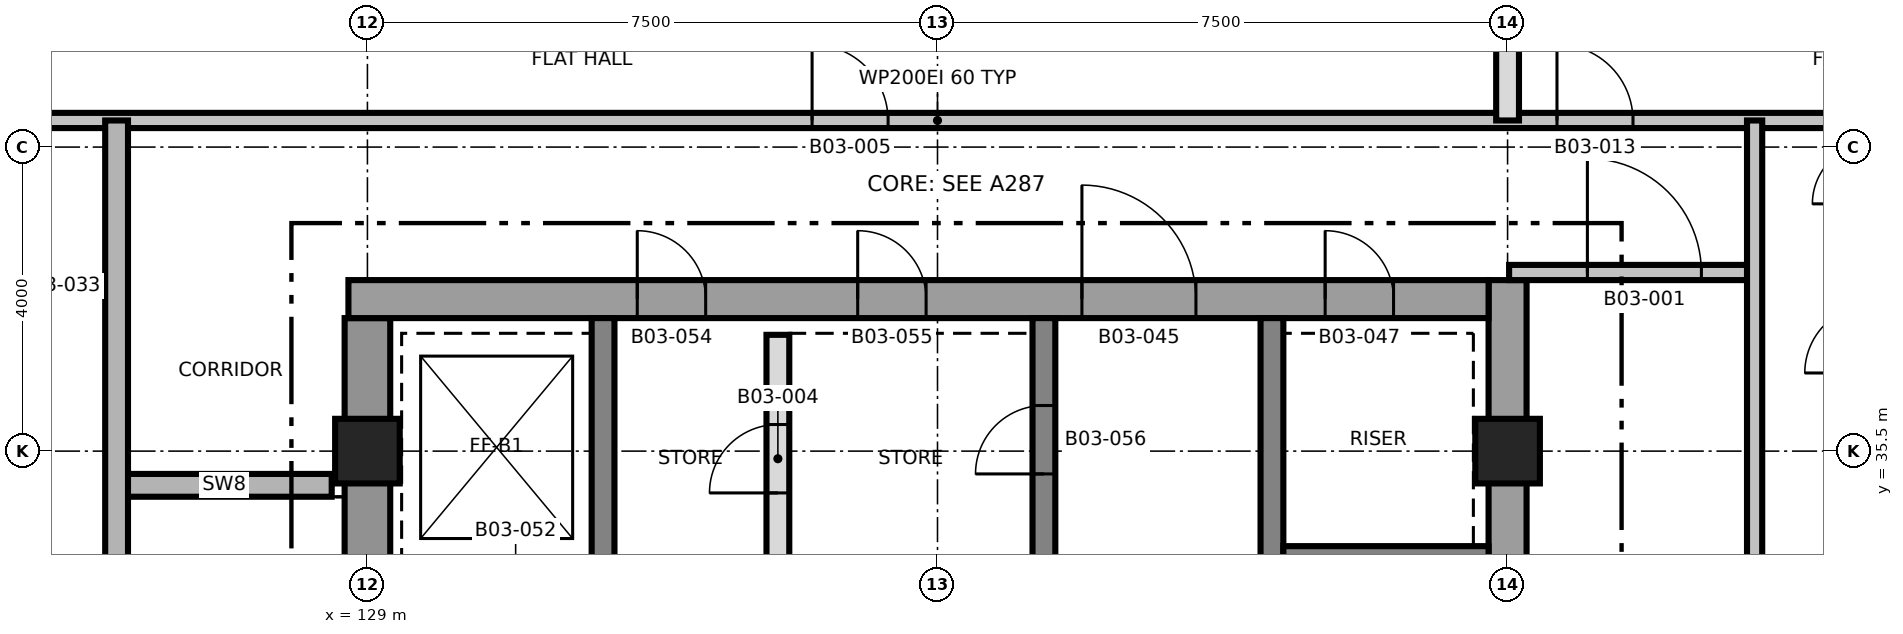
"""IFC4 building model, lengths in metres.
Left out: names, types, materials, properties, quantities, classifications, styles, units other than length and angle.
Written with IfcOpenShell. Run it as: python <this file> out.ifc"""

import sys

from ifc_helpers import new_model, si_unit, direction, frame, frame_2d, origin, origin_2d, place, context, subcontext, project, spatial, rectangle, extrude, element, fill, save


model = new_model("IFC4")
c1 = context("Model", 3, precision=1e-05, world=origin(), true_north=direction((0.0, 1.0)))
c2 = subcontext(c1, "Body", "Model", "MODEL_VIEW")
j1 = project(units=[si_unit("LENGTHUNIT", "METRE"), si_unit("PLANEANGLEUNIT", "RADIAN")], contexts=[c1])
p1 = place(None, origin())
s1 = spatial("IfcSite", under=j1, at=p1, CompositionType="ELEMENT")
p2 = place(p1, origin())
s2 = spatial("IfcBuilding", under=s1, at=p2, CompositionType="ELEMENT")
p3 = place(p2, frame((0.0, 0.0, 59.4)))
s3 = spatial("IfcBuildingStorey", under=s2, at=p3, CompositionType="ELEMENT", Elevation=59.4)
p4 = place(p3, frame((129.0, 24.75, 0.0), z_axis=(0.0, 0.0, 1.0), x_axis=(0.0, 1.0, 0.0)))
e1 = element("IfcWall", 1, at=p4, inside=s3, PredefinedType="SHEAR", context=c2, shape_type="SweptSolid", body=[
    extrude(rectangle(XDim=12.5, YDim=0.6, at=frame_2d((6.25, 0.0))), origin(), (0.0, 0.0, 1.0), 3.7),
])
p5 = place(p4, frame((5.15, 0.0, 0.0)))
e2 = element("IfcOpeningElement", 2, at=p5, cuts=e1, PredefinedType="OPENING", context=c2, shape_type="SweptSolid", body=[
    extrude(rectangle(XDim=1.0, YDim=2.1, at=frame_2d((0.5, 1.05))), frame((0.0, 0.31, 0.0), z_axis=(0.0, -1.0, 0.0), x_axis=(1.0, 0.0, 0.0)), (0.0, 0.0, 1.0), 0.62),
])
p6 = place(p3, frame((144.0, 24.25, 0.0), z_axis=(0.0, 0.0, 1.0), x_axis=(0.0, 1.0, 0.0)))
e3 = element("IfcWall", 3, at=p6, inside=s3, PredefinedType="SHEAR", context=c2, shape_type="SweptSolid", body=[
    extrude(rectangle(XDim=13.5, YDim=0.5, at=frame_2d((6.75, 0.0))), origin(), (0.0, 0.0, 1.0), 3.7),
])
p7 = place(p3, frame((128.75, 37.5, 0.0), z_axis=(0.0, 0.0, 1.0), x_axis=(1.0, 0.0, 0.0)))
e4 = element("IfcWall", 4, at=p7, inside=s3, PredefinedType="SHEAR", context=c2, shape_type="SweptSolid", body=[
    extrude(rectangle(XDim=15.0, YDim=0.5, at=frame_2d((7.5, 0.0))), origin(), (0.0, 0.0, 1.0), 3.7),
])
p8 = place(p7, frame((9.65, 0.0, 0.0)))
e5 = element("IfcOpeningElement", 5, at=p8, cuts=e4, PredefinedType="OPENING", context=c2, shape_type="SweptSolid", body=[
    extrude(rectangle(XDim=1.5, YDim=2.1, at=frame_2d((0.75, 1.05))), frame((0.0, 0.26, 0.0), z_axis=(0.0, -1.0, 0.0), x_axis=(1.0, 0.0, 0.0)), (0.0, 0.0, 1.0), 0.52),
])
p9 = place(p7, frame((12.85, 0.0, 0.0)))
e6 = element("IfcOpeningElement", 6, at=p9, cuts=e4, PredefinedType="OPENING", context=c2, shape_type="SweptSolid", body=[
    extrude(rectangle(XDim=0.9, YDim=2.1, at=frame_2d((0.45, 1.05))), frame((0.0, 0.26, 0.0), z_axis=(0.0, -1.0, 0.0), x_axis=(1.0, 0.0, 0.0)), (0.0, 0.0, 1.0), 0.52),
])
p10 = place(p7, frame((3.8, 0.0, 0.0)))
e7 = element("IfcOpeningElement", 7, at=p10, cuts=e4, PredefinedType="OPENING", context=c2, shape_type="SweptSolid", body=[
    extrude(rectangle(XDim=0.9, YDim=2.1, at=frame_2d((0.45, 1.05))), frame((0.0, 0.26, 0.0), z_axis=(0.0, -1.0, 0.0), x_axis=(1.0, 0.0, 0.0)), (0.0, 0.0, 1.0), 0.52),
])
p11 = place(p7, frame((6.7, 0.0, 0.0)))
e8 = element("IfcOpeningElement", 8, at=p11, cuts=e4, PredefinedType="OPENING", context=c2, shape_type="SweptSolid", body=[
    extrude(rectangle(XDim=0.9, YDim=2.1, at=frame_2d((0.45, 1.05))), frame((0.0, 0.26, 0.0), z_axis=(0.0, -1.0, 0.0), x_axis=(1.0, 0.0, 0.0)), (0.0, 0.0, 1.0), 0.52),
])
p12 = place(p3, frame((132.1, 24.75, 0.0), z_axis=(0.0, 0.0, 1.0), x_axis=(0.0, 1.0, 0.0)))
e9 = element("IfcWall", 9, at=p12, inside=s3, PredefinedType="SHEAR", context=c2, shape_type="SweptSolid", body=[
    extrude(rectangle(XDim=12.5, YDim=0.3, at=frame_2d((6.25, 0.0))), origin(), (0.0, 0.0, 1.0), 3.7),
])
p13 = place(p12, frame((3.9, 0.0, 0.0)))
e10 = element("IfcOpeningElement", 10, at=p13, cuts=e9, PredefinedType="OPENING", context=c2, shape_type="SweptSolid", body=[
    extrude(rectangle(XDim=1.2, YDim=2.1, at=frame_2d((0.6, 1.05))), frame((0.0, 0.16, 0.0), z_axis=(0.0, -1.0, 0.0), x_axis=(1.0, 0.0, 0.0)), (0.0, 0.0, 1.0), 0.32),
])
p14 = place(p3, frame((137.9, 24.75, 0.0), z_axis=(0.0, 0.0, 1.0), x_axis=(0.0, 1.0, 0.0)))
e11 = element("IfcWall", 11, at=p14, inside=s3, PredefinedType="SHEAR", context=c2, shape_type="SweptSolid", body=[
    extrude(rectangle(XDim=12.5, YDim=0.3, at=frame_2d((6.25, 0.0))), origin(), (0.0, 0.0, 1.0), 3.7),
])
p15 = place(p14, frame((3.95, 0.0, 0.0)))
e12 = element("IfcOpeningElement", 12, at=p15, cuts=e11, PredefinedType="OPENING", context=c2, shape_type="SweptSolid", body=[
    extrude(rectangle(XDim=1.5, YDim=2.1, at=frame_2d((0.75, 1.05))), frame((0.0, 0.16, 0.0), z_axis=(0.0, -1.0, 0.0), x_axis=(1.0, 0.0, 0.0)), (0.0, 0.0, 1.0), 0.32),
])
p16 = place(p14, frame((10.45, 0.0, 0.0)))
e13 = element("IfcOpeningElement", 13, at=p16, cuts=e11, PredefinedType="OPENING", context=c2, shape_type="SweptSolid", body=[
    extrude(rectangle(XDim=0.9, YDim=2.1, at=frame_2d((0.45, 1.05))), frame((0.0, 0.16, 0.0), z_axis=(0.0, -1.0, 0.0), x_axis=(1.0, 0.0, 0.0)), (0.0, 0.0, 1.0), 0.32),
])
p17 = place(p3, frame((140.9, 24.75, 0.0), z_axis=(0.0, 0.0, 1.0), x_axis=(0.0, 1.0, 0.0)))
e14 = element("IfcWall", 14, at=p17, inside=s3, PredefinedType="SHEAR", context=c2, shape_type="SweptSolid", body=[
    extrude(rectangle(XDim=12.5, YDim=0.3, at=frame_2d((6.25, 0.0))), origin(), (0.0, 0.0, 1.0), 3.7),
])
p18 = place(p17, frame((5.9, 0.0, 0.0)))
e15 = element("IfcOpeningElement", 15, at=p18, cuts=e14, PredefinedType="OPENING", context=c2, shape_type="SweptSolid", body=[
    extrude(rectangle(XDim=1.2, YDim=2.1, at=frame_2d((0.6, 1.05))), frame((0.0, 0.16, 0.0), z_axis=(0.0, -1.0, 0.0), x_axis=(1.0, 0.0, 0.0)), (0.0, 0.0, 1.0), 0.32),
])
p19 = place(p3, frame((141.05, 34.1, 0.0), z_axis=(0.0, 0.0, 1.0), x_axis=(1.0, 0.0, 0.0)))
e16 = element("IfcWall", 16, at=p19, inside=s3, PredefinedType="SHEAR", context=c2, shape_type="SweptSolid", body=[
    extrude(rectangle(XDim=2.7, YDim=0.3, at=frame_2d((1.35, 0.0))), origin(), (0.0, 0.0, 1.0), 3.7),
])
for number, where, z_axis, x_axis in (
    (17, (129.0, 35.5, 0.0), (0.0, 0.0, 1.0), (1.0, 0.0, 0.0)),
    (18, (144.0, 35.5, 0.0), (0.0, 0.0, 1.0), (1.0, 0.0, 0.0)),
):
    element("IfcColumn", number, at=place(p3, frame(where, z_axis=z_axis, x_axis=x_axis)), inside=s3, PredefinedType="COLUMN", context=c2, shape_type="SweptSolid", body=[
        extrude(rectangle(XDim=0.85, YDim=0.85, at=origin_2d()), origin(), (0.0, 0.0, 1.0), 3.7),
    ])
p20 = place(p3, frame((125.7, 35.05, 0.0), z_axis=(0.0, 0.0, 1.0), x_axis=(1.0, 0.0, 0.0)))
e19 = element("IfcWall", 19, at=p20, inside=s3, PredefinedType="SHEAR", context=c2, shape_type="SweptSolid", body=[
    extrude(rectangle(XDim=2.83, YDim=0.3, at=frame_2d((1.415, 0.0))), origin(), (0.0, 0.0, 1.0), 3.4),
])
p21 = place(p3, frame((144.02, 37.85, 0.0), z_axis=(0.0, 0.0, 1.0), x_axis=(1.0, 0.0, 0.0)))
e20 = element("IfcWall", 20, at=p21, inside=s3, PredefinedType="PARTITIONING", context=c2, shape_type="SweptSolid", body=[
    extrude(rectangle(XDim=3.23, YDim=0.2, at=frame_2d((1.615, 0.0))), origin(), (0.0, 0.0, 1.0), 3.4),
])
p22 = place(p21, frame((1.03, 0.0, 0.0)))
e21 = element("IfcOpeningElement", 21, at=p22, cuts=e20, PredefinedType="OPENING", context=c2, shape_type="SweptSolid", body=[
    extrude(rectangle(XDim=1.5, YDim=2.1, at=frame_2d((0.75, 1.05))), frame((0.0, 0.11, 0.0), z_axis=(0.0, -1.0, 0.0), x_axis=(1.0, 0.0, 0.0)), (0.0, 0.0, 1.0), 0.22),
])
p23 = place(p3, frame((119.58, 39.85, 0.0), z_axis=(0.0, 0.0, 1.0), x_axis=(1.0, 0.0, 0.0)))
e22 = element("IfcWall", 22, at=p23, inside=s3, PredefinedType="PARTITIONING", context=c2, shape_type="SweptSolid", body=[
    extrude(rectangle(XDim=33.84, YDim=0.2, at=frame_2d((16.92, 0.0))), origin(), (0.0, 0.0, 1.0), 3.4),
])
p24 = place(p23, frame((15.27, 0.0, 0.0)))
e23 = element("IfcOpeningElement", 23, at=p24, cuts=e22, PredefinedType="OPENING", context=c2, shape_type="SweptSolid", body=[
    extrude(rectangle(XDim=1.0, YDim=2.1, at=frame_2d((0.5, 1.05))), frame((0.0, 0.11, 0.0), z_axis=(0.0, -1.0, 0.0), x_axis=(1.0, 0.0, 0.0)), (0.0, 0.0, 1.0), 0.22),
])
p25 = place(p23, frame((25.07, 0.0, 0.0)))
e24 = element("IfcOpeningElement", 24, at=p25, cuts=e22, PredefinedType="OPENING", context=c2, shape_type="SweptSolid", body=[
    extrude(rectangle(XDim=1.0, YDim=2.1, at=frame_2d((0.5, 1.05))), frame((0.0, 0.11, 0.0), z_axis=(0.0, -1.0, 0.0), x_axis=(1.0, 0.0, 0.0)), (0.0, 0.0, 1.0), 0.22),
])
p26 = place(p3, frame((125.7, 22.15, 0.0), z_axis=(0.0, 0.0, 1.0), x_axis=(0.0, 1.0, 0.0)))
e25 = element("IfcWall", 25, at=p26, inside=s3, PredefinedType="SHEAR", context=c2, shape_type="SweptSolid", body=[
    extrude(rectangle(XDim=17.7, YDim=0.3, at=frame_2d((8.85, 0.0))), origin(), (0.0, 0.0, 1.0), 3.4),
])
p27 = place(p26, frame((2.7, 0.0, 0.0)))
e26 = element("IfcOpeningElement", 26, at=p27, cuts=e25, PredefinedType="OPENING", context=c2, shape_type="SweptSolid", body=[
    extrude(rectangle(XDim=1.0, YDim=2.1, at=frame_2d((0.5, 1.05))), frame((0.0, 0.16, 0.0), z_axis=(0.0, -1.0, 0.0), x_axis=(1.0, 0.0, 0.0)), (0.0, 0.0, 1.0), 0.32),
])
p28 = place(p3, frame((134.4, 33.77, 0.0), z_axis=(0.0, 0.0, 1.0), x_axis=(0.0, 1.0, 0.0)))
e27 = element("IfcWall", 27, at=p28, inside=s3, PredefinedType="PARTITIONING", context=c2, shape_type="SweptSolid", body=[
    extrude(rectangle(XDim=3.26, YDim=0.3, at=frame_2d((1.63, 0.0))), origin(), (0.0, 0.0, 1.0), 3.4),
])
p29 = place(p28, frame((1.18, 0.0, 0.0)))
e28 = element("IfcOpeningElement", 28, at=p29, cuts=e27, PredefinedType="OPENING", context=c2, shape_type="SweptSolid", body=[
    extrude(rectangle(XDim=0.9, YDim=2.1, at=frame_2d((0.45, 1.05))), frame((0.0, 0.16, 0.0), z_axis=(0.0, -1.0, 0.0), x_axis=(1.0, 0.0, 0.0)), (0.0, 0.0, 1.0), 0.32),
])
p30 = place(p3, frame((144.0, 39.85, 0.0), z_axis=(0.0, 0.0, 1.0), x_axis=(0.0, 1.0, 0.0)))
e29 = element("IfcWall", 29, at=p30, inside=s3, PredefinedType="PARTITIONING", context=c2, shape_type="SweptSolid", body=[
    extrude(rectangle(XDim=6.57, YDim=0.3, at=frame_2d((3.285, 0.0))), origin(), (0.0, 0.0, 1.0), 3.4),
])
p31 = place(p3, frame((147.25, 22.15, 0.0), z_axis=(0.0, 0.0, 1.0), x_axis=(0.0, 1.0, 0.0)))
e30 = element("IfcWall", 30, at=p31, inside=s3, PredefinedType="PARTITIONING", context=c2, shape_type="SweptSolid", body=[
    extrude(rectangle(XDim=17.7, YDim=0.2, at=frame_2d((8.85, 0.0))), origin(), (0.0, 0.0, 1.0), 3.4),
])
p32 = place(p31, frame((2.65, 0.0, 0.0)))
e31 = element("IfcOpeningElement", 31, at=p32, cuts=e30, PredefinedType="OPENING", context=c2, shape_type="SweptSolid", body=[
    extrude(rectangle(XDim=1.0, YDim=2.1, at=frame_2d((0.5, 1.05))), frame((0.0, 0.11, 0.0), z_axis=(0.0, -1.0, 0.0), x_axis=(1.0, 0.0, 0.0)), (0.0, 0.0, 1.0), 0.22),
])
p33 = place(p22, origin())
e32 = element("IfcDoor", 32, at=p33, inside=s3, OperationType="SINGLE_SWING_LEFT", PredefinedType="DOOR", context=c2, shape_type="SweptSolid", body=[
    extrude(rectangle(XDim=1.5, YDim=2.1, at=frame_2d((0.75, 1.05))), frame((0.0, 0.025, 0.0), z_axis=(0.0, -1.0, 0.0), x_axis=(1.0, 0.0, 0.0)), (0.0, 0.0, 1.0), 0.05),
])
fill(e21, e32)
p34 = place(p29, origin())
e33 = element("IfcDoor", 33, at=p34, inside=s3, OperationType="SINGLE_SWING_RIGHT", PredefinedType="DOOR", context=c2, shape_type="SweptSolid", body=[
    extrude(rectangle(XDim=0.9, YDim=2.1, at=frame_2d((0.45, 1.05))), frame((0.0, 0.025, 0.0), z_axis=(0.0, -1.0, 0.0), x_axis=(1.0, 0.0, 0.0)), (0.0, 0.0, 1.0), 0.05),
])
fill(e28, e33)
p35 = place(p24, origin())
e34 = element("IfcDoor", 34, at=p35, inside=s3, OperationType="SINGLE_SWING_LEFT", PredefinedType="DOOR", context=c2, shape_type="SweptSolid", body=[
    extrude(rectangle(XDim=1.0, YDim=2.1, at=frame_2d((0.5, 1.05))), frame((0.0, 0.025, 0.0), z_axis=(0.0, -1.0, 0.0), x_axis=(1.0, 0.0, 0.0)), (0.0, 0.0, 1.0), 0.05),
])
fill(e23, e34)
p36 = place(p25, origin())
e35 = element("IfcDoor", 35, at=p36, inside=s3, OperationType="SINGLE_SWING_LEFT", PredefinedType="DOOR", context=c2, shape_type="SweptSolid", body=[
    extrude(rectangle(XDim=1.0, YDim=2.1, at=frame_2d((0.5, 1.05))), frame((0.0, 0.025, 0.0), z_axis=(0.0, -1.0, 0.0), x_axis=(1.0, 0.0, 0.0)), (0.0, 0.0, 1.0), 0.05),
])
fill(e24, e35)
p37 = place(p8, origin())
e36 = element("IfcDoor", 36, at=p37, inside=s3, OperationType="SINGLE_SWING_RIGHT", PredefinedType="DOOR", context=c2, shape_type="SweptSolid", body=[
    extrude(rectangle(XDim=1.5, YDim=2.1, at=frame_2d((0.75, 1.05))), frame((0.0, 0.025, 0.0), z_axis=(0.0, -1.0, 0.0), x_axis=(1.0, 0.0, 0.0)), (0.0, 0.0, 1.0), 0.05),
])
fill(e5, e36)
p38 = place(p9, origin())
e37 = element("IfcDoor", 37, at=p38, inside=s3, OperationType="SINGLE_SWING_RIGHT", PredefinedType="DOOR", context=c2, shape_type="SweptSolid", body=[
    extrude(rectangle(XDim=0.9, YDim=2.1, at=frame_2d((0.45, 1.05))), frame((0.0, 0.025, 0.0), z_axis=(0.0, -1.0, 0.0), x_axis=(1.0, 0.0, 0.0)), (0.0, 0.0, 1.0), 0.05),
])
fill(e6, e37)
p39 = place(p10, origin())
e38 = element("IfcDoor", 38, at=p39, inside=s3, OperationType="SINGLE_SWING_LEFT", PredefinedType="DOOR", context=c2, shape_type="SweptSolid", body=[
    extrude(rectangle(XDim=0.9, YDim=2.1, at=frame_2d((0.45, 1.05))), frame((0.0, 0.025, 0.0), z_axis=(0.0, -1.0, 0.0), x_axis=(1.0, 0.0, 0.0)), (0.0, 0.0, 1.0), 0.05),
])
fill(e7, e38)
p40 = place(p11, origin())
e39 = element("IfcDoor", 39, at=p40, inside=s3, OperationType="SINGLE_SWING_RIGHT", PredefinedType="DOOR", context=c2, shape_type="SweptSolid", body=[
    extrude(rectangle(XDim=0.9, YDim=2.1, at=frame_2d((0.45, 1.05))), frame((0.0, 0.025, 0.0), z_axis=(0.0, -1.0, 0.0), x_axis=(1.0, 0.0, 0.0)), (0.0, 0.0, 1.0), 0.05),
])
fill(e8, e39)
p41 = place(p16, origin())
e40 = element("IfcDoor", 40, at=p41, inside=s3, OperationType="SINGLE_SWING_RIGHT", PredefinedType="DOOR", context=c2, shape_type="SweptSolid", body=[
    extrude(rectangle(XDim=0.9, YDim=2.1, at=frame_2d((0.45, 1.05))), frame((0.0, 0.025, 0.0), z_axis=(0.0, -1.0, 0.0), x_axis=(1.0, 0.0, 0.0)), (0.0, 0.0, 1.0), 0.05),
])
fill(e13, e40)
save(model, sys.argv[1])
